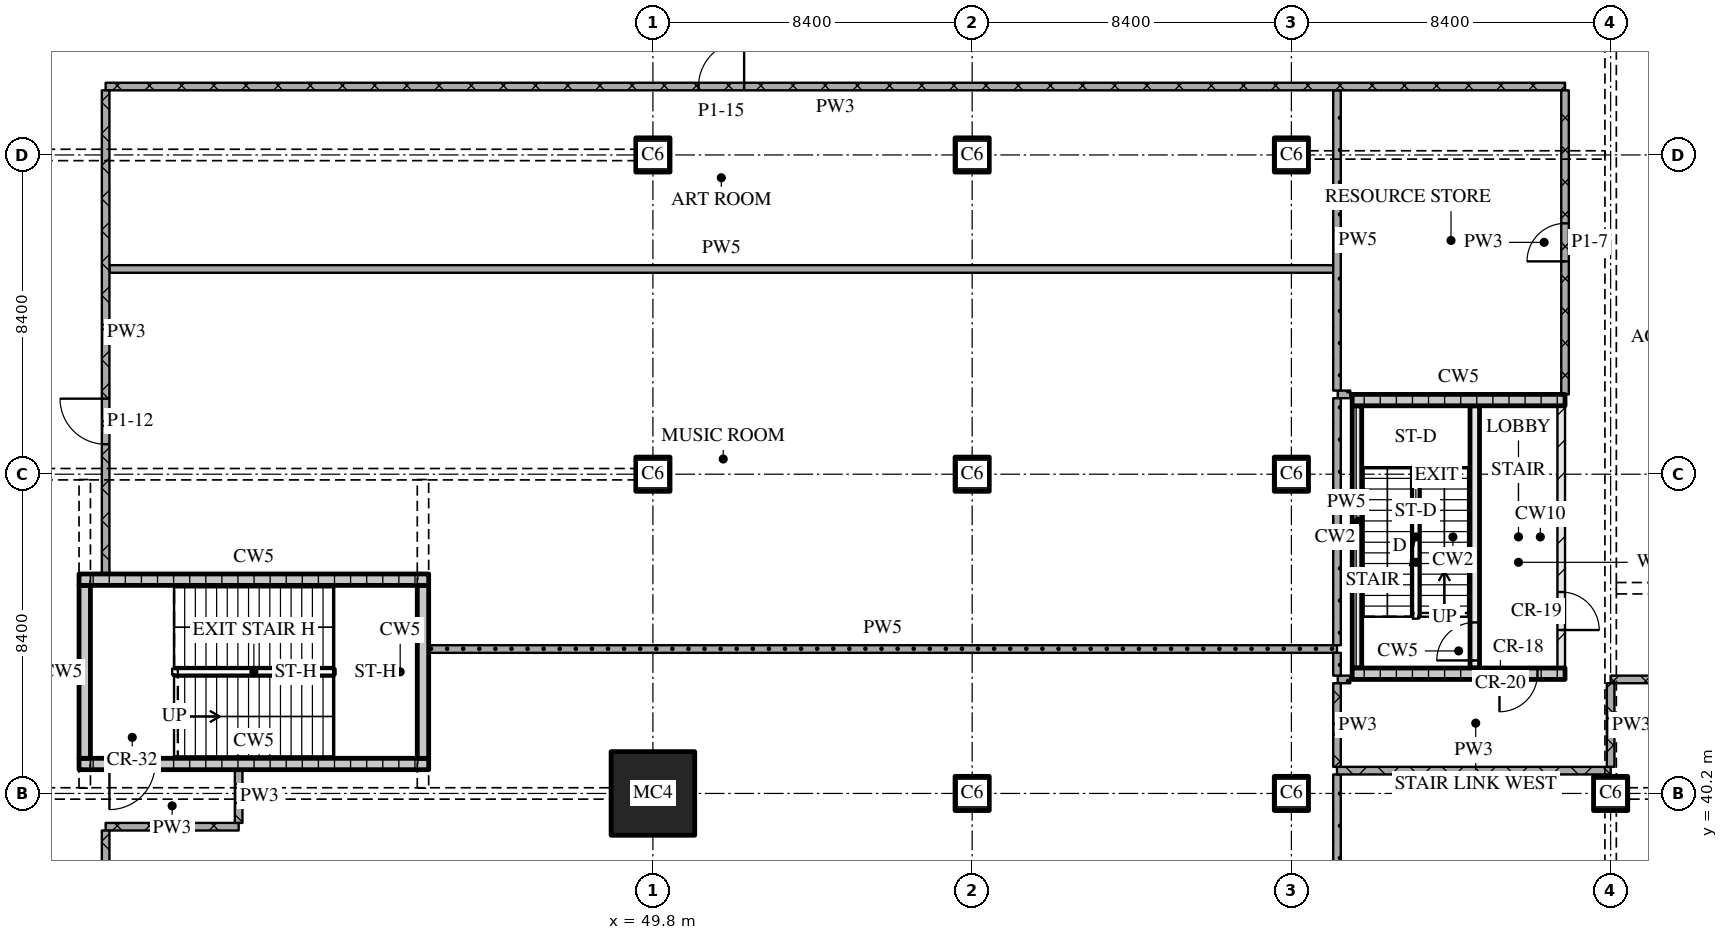
"""IFC4 building model, lengths in metres.
Left out: names, types, materials, properties, quantities, classifications, styles, units other than length and angle.
Written with IfcOpenShell. Run it as: python <this file> out.ifc"""

import sys

from ifc_helpers import new_model, si_unit, direction, frame, frame_2d, origin, origin_2d, place, context, subcontext, project, spatial, rectangle, extrude, element, fill, save


model = new_model("IFC4")
c1 = context("Model", 3, precision=1e-05, world=origin(), true_north=direction((0.0, 1.0)))
c2 = subcontext(c1, "Body", "Model", "MODEL_VIEW")
j1 = project(units=[si_unit("LENGTHUNIT", "METRE"), si_unit("PLANEANGLEUNIT", "RADIAN")], contexts=[c1])
p1 = place(None, origin())
s1 = spatial("IfcSite", under=j1, at=p1, CompositionType="ELEMENT")
p2 = place(p1, origin())
s2 = spatial("IfcBuilding", under=s1, at=p2, CompositionType="ELEMENT")
p3 = place(p2, frame((0.0, 0.0, 9.0)))
s3 = spatial("IfcBuildingStorey", under=s2, at=p3, CompositionType="ELEMENT", Elevation=9.0)
p4 = place(p3, frame((49.8, 40.2, 0.0), z_axis=(0.0, 0.0, 1.0), x_axis=(1.0, 0.0, 0.0)))
e1 = element("IfcColumn", 1, at=p4, inside=s3, PredefinedType="COLUMN", context=c2, shape_type="SweptSolid", body=[
    extrude(rectangle(XDim=2.2, YDim=2.2, at=origin_2d()), origin(), (0.0, 0.0, 1.0), 5.4),
])
for number, where, z_axis, x_axis in (
    (2, (49.8, 48.6, 0.0), (0.0, 0.0, 1.0), (1.0, 0.0, 0.0)),
    (3, (49.8, 57.0, 0.0), (0.0, 0.0, 1.0), (1.0, 0.0, 0.0)),
    (4, (58.2, 40.2, 0.0), (0.0, 0.0, 1.0), (1.0, 0.0, 0.0)),
    (5, (58.2, 48.6, 0.0), (0.0, 0.0, 1.0), (1.0, 0.0, 0.0)),
    (6, (58.2, 57.0, 0.0), (0.0, 0.0, 1.0), (1.0, 0.0, 0.0)),
    (7, (66.6, 40.2, 0.0), (0.0, 0.0, 1.0), (1.0, 0.0, 0.0)),
    (8, (66.6, 48.6, 0.0), (0.0, 0.0, 1.0), (1.0, 0.0, 0.0)),
    (9, (66.6, 57.0, 0.0), (0.0, 0.0, 1.0), (1.0, 0.0, 0.0)),
    (10, (75.0, 40.2, 0.0), (0.0, 0.0, 1.0), (1.0, 0.0, 0.0)),
):
    element("IfcColumn", number, at=place(p3, frame(where, z_axis=z_axis, x_axis=x_axis)), inside=s3, PredefinedType="COLUMN", context=c2, shape_type="SweptSolid", body=[
        extrude(rectangle(XDim=0.9, YDim=0.9, at=origin_2d()), origin(), (0.0, 0.0, 1.0), 5.4),
    ])
p5 = place(p3, frame((68.2, 43.35, 0.0), z_axis=(0.0, 0.0, 1.0), x_axis=(1.0, 0.0, 0.0)))
e11 = element("IfcWall", 11, at=p5, inside=s3, PredefinedType="SOLIDWALL", context=c2, shape_type="SweptSolid", body=[
    extrude(rectangle(XDim=5.6, YDim=0.3, at=frame_2d((2.8, 0.0))), origin(), (0.0, 0.0, 1.0), 5.1),
])
p6 = place(p5, frame((3.875, 0.0, 0.0)))
e12 = element("IfcOpeningElement", 12, at=p6, cuts=e11, PredefinedType="OPENING", context=c2, shape_type="SweptSolid", body=[
    extrude(rectangle(XDim=1.0, YDim=2.1, at=frame_2d((0.5, 1.05))), frame((0.0, 0.16, 0.0), z_axis=(0.0, -1.0, 0.0), x_axis=(1.0, 0.0, 0.0)), (0.0, 0.0, 1.0), 0.32),
])
p7 = place(p3, frame((68.325, 43.5, 0.0), z_axis=(0.0, 0.0, 1.0), x_axis=(0.0, 1.0, 0.0)))
e13 = element("IfcWall", 13, at=p7, inside=s3, PredefinedType="SOLIDWALL", context=c2, shape_type="SweptSolid", body=[
    extrude(rectangle(XDim=6.9, YDim=0.25, at=frame_2d((3.45, 0.0))), origin(), (0.0, 0.0, 1.0), 5.1),
])
p8 = place(p3, frame((71.425, 43.5, 0.0), z_axis=(0.0, 0.0, 1.0), x_axis=(0.0, 1.0, 0.0)))
e14 = element("IfcWall", 14, at=p8, inside=s3, PredefinedType="SOLIDWALL", context=c2, shape_type="SweptSolid", body=[
    extrude(rectangle(XDim=6.9, YDim=0.25, at=frame_2d((3.45, 0.0))), origin(), (0.0, 0.0, 1.0), 5.1),
])
p9 = place(p8, frame((0.2, 0.0, 0.0)))
e15 = element("IfcOpeningElement", 15, at=p9, cuts=e14, PredefinedType="OPENING", context=c2, shape_type="SweptSolid", body=[
    extrude(rectangle(XDim=1.0, YDim=2.1, at=frame_2d((0.5, 1.05))), frame((0.0, 0.135, 0.0), z_axis=(0.0, -1.0, 0.0), x_axis=(1.0, 0.0, 0.0)), (0.0, 0.0, 1.0), 0.27),
])
p10 = place(p3, frame((73.7, 43.5, 0.0), z_axis=(0.0, 0.0, 1.0), x_axis=(0.0, 1.0, 0.0)))
e16 = element("IfcWall", 16, at=p10, inside=s3, PredefinedType="PARTITIONING", context=c2, shape_type="SweptSolid", body=[
    extrude(rectangle(XDim=6.9, YDim=0.2, at=frame_2d((3.45, 0.0))), origin(), (0.0, 0.0, 1.0), 5.1),
])
p11 = place(p10, frame((1.0, 0.0, 0.0)))
e17 = element("IfcOpeningElement", 17, at=p11, cuts=e16, PredefinedType="OPENING", context=c2, shape_type="SweptSolid", body=[
    extrude(rectangle(XDim=1.0, YDim=2.1, at=frame_2d((0.5, 1.05))), frame((0.0, 0.11, 0.0), z_axis=(0.0, -1.0, 0.0), x_axis=(1.0, 0.0, 0.0)), (0.0, 0.0, 1.0), 0.22),
])
p12 = place(p3, frame((68.2, 50.55, 0.0), z_axis=(0.0, 0.0, 1.0), x_axis=(1.0, 0.0, 0.0)))
e18 = element("IfcWall", 18, at=p12, inside=s3, PredefinedType="SOLIDWALL", context=c2, shape_type="SweptSolid", body=[
    extrude(rectangle(XDim=5.6, YDim=0.3, at=frame_2d((2.8, 0.0))), origin(), (0.0, 0.0, 1.0), 5.1),
])
p13 = place(p3, frame((34.7, 40.975, 0.0), z_axis=(0.0, 0.0, 1.0), x_axis=(1.0, 0.0, 0.0)))
e19 = element("IfcWall", 19, at=p13, inside=s3, PredefinedType="SOLIDWALL", context=c2, shape_type="SweptSolid", body=[
    extrude(rectangle(XDim=9.2, YDim=0.3, at=frame_2d((4.6, 0.0))), origin(), (0.0, 0.0, 1.0), 5.1),
])
p14 = place(p13, frame((0.8, 0.0, 0.0)))
e20 = element("IfcOpeningElement", 20, at=p14, cuts=e19, PredefinedType="OPENING", context=c2, shape_type="SweptSolid", body=[
    extrude(rectangle(XDim=1.2, YDim=2.1, at=frame_2d((0.6, 1.05))), frame((0.0, 0.16, 0.0), z_axis=(0.0, -1.0, 0.0), x_axis=(1.0, 0.0, 0.0)), (0.0, 0.0, 1.0), 0.32),
])
for number, where, z_axis, x_axis in (
    (21, (34.85, 41.125, 0.0), (0.0, 0.0, 1.0), (0.0, 1.0, 0.0)),
    (22, (43.75, 41.125, 0.0), (0.0, 0.0, 1.0), (0.0, 1.0, 0.0)),
):
    element("IfcWall", number, at=place(p3, frame(where, z_axis=z_axis, x_axis=x_axis)), inside=s3, PredefinedType="SOLIDWALL", context=c2, shape_type="SweptSolid", body=[
        extrude(rectangle(XDim=4.55, YDim=0.3, at=frame_2d((2.275, 0.0))), origin(), (0.0, 0.0, 1.0), 5.1),
    ])
p15 = place(p3, frame((34.7, 45.825, 0.0), z_axis=(0.0, 0.0, 1.0), x_axis=(1.0, 0.0, 0.0)))
e23 = element("IfcWall", 23, at=p15, inside=s3, PredefinedType="SOLIDWALL", context=c2, shape_type="SweptSolid", body=[
    extrude(rectangle(XDim=9.2, YDim=0.3, at=frame_2d((4.6, 0.0))), origin(), (0.0, 0.0, 1.0), 5.1),
])
p16 = place(p3, frame((35.4, 39.325, 0.0), z_axis=(0.0, 0.0, 1.0), x_axis=(1.0, 0.0, 0.0)))
e24 = element("IfcWall", 24, at=p16, inside=s3, PredefinedType="PARTITIONING", context=c2, shape_type="SweptSolid", body=[
    extrude(rectangle(XDim=3.5, YDim=0.2, at=frame_2d((1.75, 0.0))), origin(), (0.0, 0.0, 1.0), 5.1),
])
p17 = place(p3, frame((67.8, 40.8, 0.0), z_axis=(0.0, 0.0, 1.0), x_axis=(1.0, 0.0, 0.0)))
e25 = element("IfcWall", 25, at=p17, inside=s3, PredefinedType="PARTITIONING", context=c2, shape_type="SweptSolid", body=[
    extrude(rectangle(XDim=7.2, YDim=0.2, at=frame_2d((3.6, 0.0))), origin(), (0.0, 0.0, 1.0), 5.1),
])
p18 = place(p3, frame((75.0, 43.2, 0.0), z_axis=(0.0, 0.0, 1.0), x_axis=(1.0, 0.0, 0.0)))
e26 = element("IfcWall", 26, at=p18, inside=s3, PredefinedType="PARTITIONING", context=c2, shape_type="SweptSolid", body=[
    extrude(rectangle(XDim=25.2, YDim=0.2, at=frame_2d((12.6, 0.0))), origin(), (0.0, 0.0, 1.0), 5.1),
])
p19 = place(p3, frame((67.82, 43.2, 0.0), z_axis=(0.0, 0.0, 1.0), x_axis=(1.0, 0.0, 0.0)))
e27 = element("IfcWall", 27, at=p19, inside=s3, PredefinedType="PARTITIONING", context=c2, shape_type="SweptSolid", body=[
    extrude(rectangle(XDim=0.33, YDim=0.2, at=frame_2d((0.165, 0.0))), origin(), (0.0, 0.0, 1.0), 5.1),
])
p20 = place(p3, frame((43.9, 44.0, 0.0), z_axis=(0.0, 0.0, 1.0), x_axis=(1.0, 0.0, 0.0)))
e28 = element("IfcWall", 28, at=p20, inside=s3, PredefinedType="PARTITIONING", context=c2, shape_type="SweptSolid", body=[
    extrude(rectangle(XDim=23.9, YDim=0.2, at=frame_2d((11.95, 0.0))), origin(), (0.0, 0.0, 1.0), 5.1),
])
p21 = place(p3, frame((67.82, 50.7, 0.0), z_axis=(0.0, 0.0, 1.0), x_axis=(1.0, 0.0, 0.0)))
e29 = element("IfcWall", 29, at=p21, inside=s3, PredefinedType="PARTITIONING", context=c2, shape_type="SweptSolid", body=[
    extrude(rectangle(XDim=0.33, YDim=0.2, at=frame_2d((0.165, 0.0))), origin(), (0.0, 0.0, 1.0), 5.1),
])
p22 = place(p3, frame((35.5, 54.0, 0.0), z_axis=(0.0, 0.0, 1.0), x_axis=(1.0, 0.0, 0.0)))
e30 = element("IfcWall", 30, at=p22, inside=s3, PredefinedType="PARTITIONING", context=c2, shape_type="SweptSolid", body=[
    extrude(rectangle(XDim=32.2, YDim=0.2, at=frame_2d((16.1, 0.0))), origin(), (0.0, 0.0, 1.0), 5.1),
])
p23 = place(p3, frame((73.8, 58.8, 0.0), z_axis=(0.0, 0.0, 1.0), x_axis=(-1.0, 0.0, 0.0)))
e31 = element("IfcWall", 31, at=p23, inside=s3, PredefinedType="PARTITIONING", context=c2, shape_type="SweptSolid", body=[
    extrude(rectangle(XDim=38.4, YDim=0.2, at=frame_2d((19.2, 0.0))), origin(), (0.0, 0.0, 1.0), 5.1),
])
p24 = place(p23, frame((21.6, 0.0, 0.0)))
e32 = element("IfcOpeningElement", 32, at=p24, cuts=e31, PredefinedType="OPENING", context=c2, shape_type="SweptSolid", body=[
    extrude(rectangle(XDim=1.2, YDim=2.1, at=frame_2d((0.6, 1.05))), frame((0.0, 0.11, 0.0), z_axis=(0.0, -1.0, 0.0), x_axis=(1.0, 0.0, 0.0)), (0.0, 0.0, 1.0), 0.22),
])
p25 = place(p3, frame((35.4, 39.225, 0.0), z_axis=(0.0, 0.0, 1.0), x_axis=(0.0, -1.0, 0.0)))
e33 = element("IfcWall", 33, at=p25, inside=s3, PredefinedType="PARTITIONING", context=c2, shape_type="SweptSolid", body=[
    extrude(rectangle(XDim=19.925, YDim=0.2, at=frame_2d((9.962, 0.0))), origin(), (0.0, 0.0, 1.0), 5.1),
])
p26 = place(p25, frame((9.363, 0.0, 0.0)))
e34 = element("IfcOpeningElement", 34, at=p26, cuts=e33, PredefinedType="OPENING", context=c2, shape_type="SweptSolid", body=[
    extrude(rectangle(XDim=1.2, YDim=2.1, at=frame_2d((0.6, 1.05))), frame((0.0, 0.11, 0.0), z_axis=(0.0, -1.0, 0.0), x_axis=(1.0, 0.0, 0.0)), (0.0, 0.0, 1.0), 0.22),
])
p27 = place(p3, frame((35.4, 58.7, 0.0), z_axis=(0.0, 0.0, 1.0), x_axis=(0.0, -1.0, 0.0)))
e35 = element("IfcWall", 35, at=p27, inside=s3, PredefinedType="PARTITIONING", context=c2, shape_type="SweptSolid", body=[
    extrude(rectangle(XDim=12.725, YDim=0.2, at=frame_2d((6.362, 0.0))), origin(), (0.0, 0.0, 1.0), 5.1),
])
p28 = place(p27, frame((8.113, 0.0, 0.0)))
e36 = element("IfcOpeningElement", 36, at=p28, cuts=e35, PredefinedType="OPENING", context=c2, shape_type="SweptSolid", body=[
    extrude(rectangle(XDim=1.2, YDim=2.1, at=frame_2d((0.6, 1.05))), frame((0.0, 0.11, 0.0), z_axis=(0.0, -1.0, 0.0), x_axis=(1.0, 0.0, 0.0)), (0.0, 0.0, 1.0), 0.22),
])
p29 = place(p3, frame((38.9, 40.825, 0.0), z_axis=(0.0, 0.0, 1.0), x_axis=(0.0, -1.0, 0.0)))
e37 = element("IfcWall", 37, at=p29, inside=s3, PredefinedType="PARTITIONING", context=c2, shape_type="SweptSolid", body=[
    extrude(rectangle(XDim=1.4, YDim=0.2, at=frame_2d((0.7, 0.0))), origin(), (0.0, 0.0, 1.0), 5.1),
])
p30 = place(p3, frame((67.8, 43.1, 0.0), z_axis=(0.0, 0.0, 1.0), x_axis=(0.0, -1.0, 0.0)))
e38 = element("IfcWall", 38, at=p30, inside=s3, PredefinedType="PARTITIONING", context=c2, shape_type="SweptSolid", body=[
    extrude(rectangle(XDim=2.2, YDim=0.2, at=frame_2d((1.1, 0.0))), origin(), (0.0, 0.0, 1.0), 5.1),
])
p31 = place(p3, frame((67.8, 43.9, 0.0), z_axis=(0.0, 0.0, 1.0), x_axis=(0.0, -1.0, 0.0)))
e39 = element("IfcWall", 39, at=p31, inside=s3, PredefinedType="PARTITIONING", context=c2, shape_type="SweptSolid", body=[
    extrude(rectangle(XDim=0.6, YDim=0.2, at=frame_2d((0.3, 0.0))), origin(), (0.0, 0.0, 1.0), 5.1),
])
p32 = place(p3, frame((67.8, 50.6, 0.0), z_axis=(0.0, 0.0, 1.0), x_axis=(0.0, -1.0, 0.0)))
e40 = element("IfcWall", 40, at=p32, inside=s3, PredefinedType="PARTITIONING", context=c2, shape_type="SweptSolid", body=[
    extrude(rectangle(XDim=6.5, YDim=0.2, at=frame_2d((3.25, 0.0))), origin(), (0.0, 0.0, 1.0), 5.1),
])
p33 = place(p3, frame((67.8, 40.7, 0.0), z_axis=(0.0, 0.0, 1.0), x_axis=(0.0, -1.0, 0.0)))
e41 = element("IfcWall", 41, at=p33, inside=s3, PredefinedType="PARTITIONING", context=c2, shape_type="SweptSolid", body=[
    extrude(rectangle(XDim=21.4, YDim=0.2, at=frame_2d((10.7, 0.0))), origin(), (0.0, 0.0, 1.0), 5.1),
])
p34 = place(p3, frame((67.8, 58.7, 0.0), z_axis=(0.0, 0.0, 1.0), x_axis=(0.0, -1.0, 0.0)))
e42 = element("IfcWall", 42, at=p34, inside=s3, PredefinedType="PARTITIONING", context=c2, shape_type="SweptSolid", body=[
    extrude(rectangle(XDim=7.9, YDim=0.2, at=frame_2d((3.95, 0.0))), origin(), (0.0, 0.0, 1.0), 5.1),
])
p35 = place(p3, frame((73.8, 50.7, 0.0), z_axis=(0.0, 0.0, 1.0), x_axis=(0.0, 1.0, 0.0)))
e43 = element("IfcWall", 43, at=p35, inside=s3, PredefinedType="PARTITIONING", context=c2, shape_type="SweptSolid", body=[
    extrude(rectangle(XDim=8.0, YDim=0.2, at=frame_2d((4.0, 0.0))), origin(), (0.0, 0.0, 1.0), 5.1),
])
p36 = place(p35, frame((3.5, 0.0, 0.0)))
e44 = element("IfcOpeningElement", 44, at=p36, cuts=e43, PredefinedType="OPENING", context=c2, shape_type="SweptSolid", body=[
    extrude(rectangle(XDim=1.0, YDim=2.1, at=frame_2d((0.5, 1.05))), frame((0.0, 0.11, 0.0), z_axis=(0.0, -1.0, 0.0), x_axis=(1.0, 0.0, 0.0)), (0.0, 0.0, 1.0), 0.22),
])
p37 = place(p3, frame((75.0, 43.1, 0.0), z_axis=(0.0, 0.0, 1.0), x_axis=(0.0, -1.0, 0.0)))
e45 = element("IfcWall", 45, at=p37, inside=s3, PredefinedType="PARTITIONING", context=c2, shape_type="SweptSolid", body=[
    extrude(rectangle(XDim=2.2, YDim=0.2, at=frame_2d((1.1, 0.0))), origin(), (0.0, 0.0, 1.0), 4.2),
])
p38 = place(p6, origin())
e46 = element("IfcDoor", 46, at=p38, inside=s3, OperationType="SINGLE_SWING_RIGHT", PredefinedType="DOOR", context=c2, shape_type="SweptSolid", body=[
    extrude(rectangle(XDim=1.0, YDim=2.1, at=frame_2d((0.5, 1.05))), frame((0.0, 0.025, 0.0), z_axis=(0.0, -1.0, 0.0), x_axis=(1.0, 0.0, 0.0)), (0.0, 0.0, 1.0), 0.05),
])
fill(e12, e46)
p39 = place(p9, origin())
e47 = element("IfcDoor", 47, at=p39, inside=s3, OperationType="SINGLE_SWING_LEFT", PredefinedType="DOOR", context=c2, shape_type="SweptSolid", body=[
    extrude(rectangle(XDim=1.0, YDim=2.1, at=frame_2d((0.5, 1.05))), frame((0.0, 0.025, 0.0), z_axis=(0.0, -1.0, 0.0), x_axis=(1.0, 0.0, 0.0)), (0.0, 0.0, 1.0), 0.05),
])
fill(e15, e47)
p40 = place(p11, origin())
e48 = element("IfcDoor", 48, at=p40, inside=s3, OperationType="SINGLE_SWING_RIGHT", PredefinedType="DOOR", context=c2, shape_type="SweptSolid", body=[
    extrude(rectangle(XDim=1.0, YDim=2.1, at=frame_2d((0.5, 1.05))), frame((0.0, 0.025, 0.0), z_axis=(0.0, -1.0, 0.0), x_axis=(1.0, 0.0, 0.0)), (0.0, 0.0, 1.0), 0.05),
])
fill(e17, e48)
p41 = place(p14, origin())
e49 = element("IfcDoor", 49, at=p41, inside=s3, OperationType="SINGLE_SWING_RIGHT", PredefinedType="DOOR", context=c2, shape_type="SweptSolid", body=[
    extrude(rectangle(XDim=1.2, YDim=2.1, at=frame_2d((0.6, 1.05))), frame((0.0, 0.025, 0.0), z_axis=(0.0, -1.0, 0.0), x_axis=(1.0, 0.0, 0.0)), (0.0, 0.0, 1.0), 0.05),
])
fill(e20, e49)
p42 = place(p24, origin())
e50 = element("IfcDoor", 50, at=p42, inside=s3, OperationType="SINGLE_SWING_RIGHT", PredefinedType="DOOR", context=c2, shape_type="SweptSolid", body=[
    extrude(rectangle(XDim=1.2, YDim=2.1, at=frame_2d((0.6, 1.05))), frame((0.0, 0.025, 0.0), z_axis=(0.0, -1.0, 0.0), x_axis=(1.0, 0.0, 0.0)), (0.0, 0.0, 1.0), 0.05),
])
fill(e32, e50)
p43 = place(p28, origin())
e51 = element("IfcDoor", 51, at=p43, inside=s3, OperationType="SINGLE_SWING_RIGHT", PredefinedType="DOOR", context=c2, shape_type="SweptSolid", body=[
    extrude(rectangle(XDim=1.2, YDim=2.1, at=frame_2d((0.6, 1.05))), frame((0.0, 0.025, 0.0), z_axis=(0.0, -1.0, 0.0), x_axis=(1.0, 0.0, 0.0)), (0.0, 0.0, 1.0), 0.05),
])
fill(e36, e51)
p44 = place(p36, origin())
e52 = element("IfcDoor", 52, at=p44, inside=s3, OperationType="SINGLE_SWING_LEFT", PredefinedType="DOOR", context=c2, shape_type="SweptSolid", body=[
    extrude(rectangle(XDim=1.0, YDim=2.1, at=frame_2d((0.5, 1.05))), frame((0.0, 0.025, 0.0), z_axis=(0.0, -1.0, 0.0), x_axis=(1.0, 0.0, 0.0)), (0.0, 0.0, 1.0), 0.05),
])
fill(e44, e52)
save(model, sys.argv[1])
